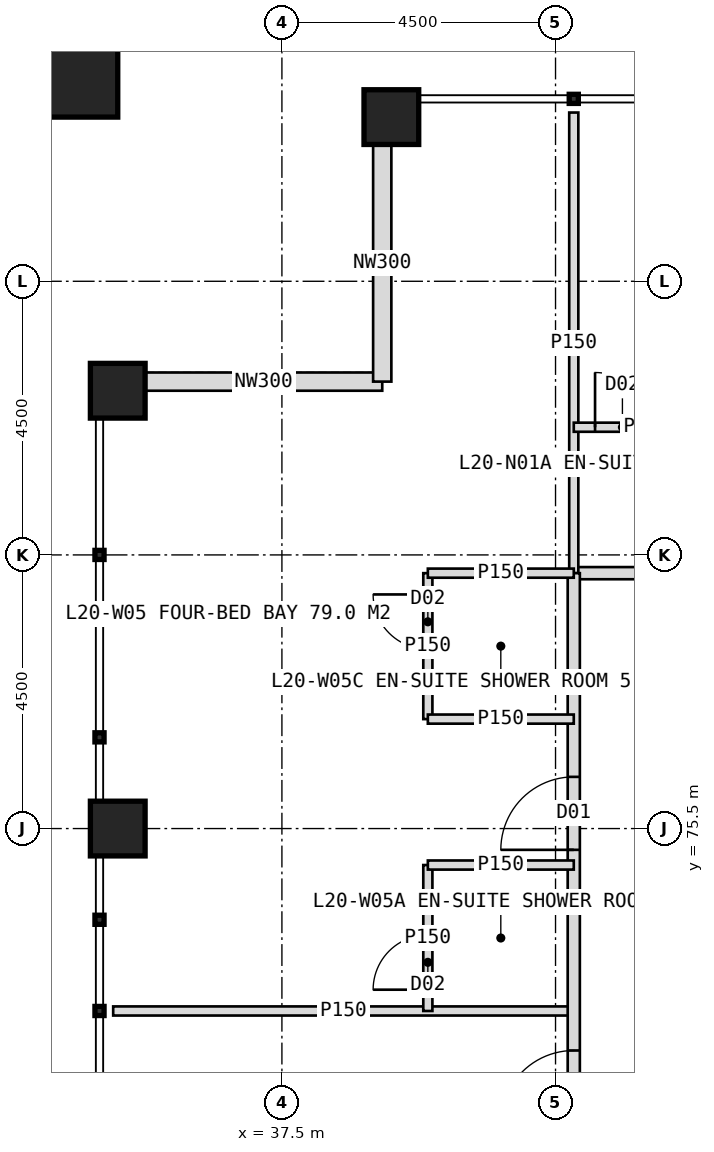
"""IFC4 building model, lengths in metres.
Left out: names, types, materials, properties, quantities, classifications, styles, units other than length and angle.
Written with IfcOpenShell. Run it as: python <this file> out.ifc"""

import sys

from ifc_helpers import new_model, si_unit, direction, frame, frame_2d, origin, origin_2d, place, context, subcontext, project, spatial, rectangle, hollow_rectangle, extrude, element, fill, save


model = new_model("IFC4")
c1 = context("Model", 3, precision=1e-05, world=origin(), true_north=direction((0.0, 1.0)))
c2 = subcontext(c1, "Body", "Model", "MODEL_VIEW")
j1 = project(units=[si_unit("LENGTHUNIT", "METRE"), si_unit("PLANEANGLEUNIT", "RADIAN")], contexts=[c1])
p1 = place(None, origin())
s1 = spatial("IfcSite", under=j1, at=p1, CompositionType="ELEMENT")
p2 = place(p1, origin())
s2 = spatial("IfcBuilding", under=s1, at=p2, CompositionType="ELEMENT")
p3 = place(p2, frame((0.0, 0.0, 87.0)))
s3 = spatial("IfcBuildingStorey", under=s2, at=p3, CompositionType="ELEMENT", Elevation=87.0)
for number, where, z_axis, x_axis in (
    (1, (39.3, 87.2, 0.0), (0.0, 0.0, 1.0), (1.0, 0.0, 0.0)),
    (2, (34.8, 75.5, 0.0), (0.0, 0.0, 1.0), (1.0, 0.0, 0.0)),
    (3, (34.8, 82.7, 0.0), (0.0, 0.0, 1.0), (1.0, 0.0, 0.0)),
):
    element("IfcColumn", number, at=place(p3, frame(where, z_axis=z_axis, x_axis=x_axis)), inside=s3, PredefinedType="COLUMN", context=c2, shape_type="SweptSolid", body=[
        extrude(hollow_rectangle(XDim=0.9, YDim=0.9, WallThickness=0.08, at=origin_2d()), origin(), (0.0, 0.0, 1.0), 4.0),
    ])
p4 = place(p3, frame((33.9, 88.1, 0.0), z_axis=(0.0, 0.0, 1.0), x_axis=(1.0, 0.0, 0.0)))
e4 = element("IfcColumn", 4, at=p4, inside=s3, PredefinedType="COLUMN", context=c2, shape_type="SweptSolid", body=[
    extrude(hollow_rectangle(XDim=1.8, YDim=1.8, WallThickness=0.1, at=origin_2d()), origin(), (0.0, 0.0, 1.0), 4.0),
])
for number, where, z_axis, x_axis in (
    (5, (35.25, 82.85, 0.0), (0.0, 0.0, 1.0), (1.0, 0.0, 0.0)),
    (6, (39.15, 82.85, 0.0), (0.0, 0.0, 1.0), (0.0, 1.0, 0.0)),
):
    element("IfcWall", number, at=place(p3, frame(where, z_axis=z_axis, x_axis=x_axis)), inside=s3, PredefinedType="ELEMENTEDWALL", context=c2, shape_type="SweptSolid", body=[
        extrude(rectangle(XDim=3.9, YDim=0.3, at=frame_2d((1.95, 0.0))), origin(), (0.0, 0.0, 1.0), 2.95),
    ])
p5 = place(p3, frame((42.3, 79.7, 0.0), z_axis=(0.0, 0.0, 1.0), x_axis=(1.0, 0.0, 0.0)))
e7 = element("IfcWall", 7, at=p5, inside=s3, PredefinedType="PARTITIONING", context=c2, shape_type="SweptSolid", body=[
    extrude(rectangle(XDim=35.4, YDim=0.2, at=frame_2d((17.7, 0.0))), origin(), (0.0, 0.0, 1.0), 3.75),
])
p6 = place(p5, frame((2.65, 0.0, 0.0)))
e8 = element("IfcOpeningElement", 8, at=p6, cuts=e7, PredefinedType="OPENING", context=c2, shape_type="SweptSolid", body=[
    extrude(rectangle(XDim=1.2, YDim=2.2, at=frame_2d((0.6, 1.1))), frame((0.0, 0.11, 0.0), z_axis=(0.0, -1.0, 0.0), x_axis=(1.0, 0.0, 0.0)), (0.0, 0.0, 1.0), 0.22),
])
p7 = place(p5, frame((11.2, 0.0, 0.0)))
e9 = element("IfcOpeningElement", 9, at=p7, cuts=e7, PredefinedType="OPENING", context=c2, shape_type="SweptSolid", body=[
    extrude(rectangle(XDim=1.0, YDim=2.1, at=frame_2d((0.5, 1.05))), frame((0.0, 0.11, 0.0), z_axis=(0.0, -1.0, 0.0), x_axis=(1.0, 0.0, 0.0)), (0.0, 0.0, 1.0), 0.22),
])
p8 = place(p5, frame((17.2, 0.0, 0.0)))
e10 = element("IfcOpeningElement", 10, at=p8, cuts=e7, PredefinedType="OPENING", context=c2, shape_type="SweptSolid", body=[
    extrude(rectangle(XDim=1.0, YDim=2.1, at=frame_2d((0.5, 1.05))), frame((0.0, 0.11, 0.0), z_axis=(0.0, -1.0, 0.0), x_axis=(1.0, 0.0, 0.0)), (0.0, 0.0, 1.0), 0.22),
])
p9 = place(p5, frame((23.35, 0.0, 0.0)))
e11 = element("IfcOpeningElement", 11, at=p9, cuts=e7, PredefinedType="OPENING", context=c2, shape_type="SweptSolid", body=[
    extrude(rectangle(XDim=1.2, YDim=2.2, at=frame_2d((0.6, 1.1))), frame((0.0, 0.11, 0.0), z_axis=(0.0, -1.0, 0.0), x_axis=(1.0, 0.0, 0.0)), (0.0, 0.0, 1.0), 0.22),
])
p10 = place(p5, frame((29.35, 0.0, 0.0)))
e12 = element("IfcOpeningElement", 12, at=p10, cuts=e7, PredefinedType="OPENING", context=c2, shape_type="SweptSolid", body=[
    extrude(rectangle(XDim=1.2, YDim=2.2, at=frame_2d((0.6, 1.1))), frame((0.0, 0.11, 0.0), z_axis=(0.0, -1.0, 0.0), x_axis=(1.0, 0.0, 0.0)), (0.0, 0.0, 1.0), 0.22),
])
p11 = place(p3, frame((42.3, 79.7, 0.0), z_axis=(0.0, 0.0, 1.0), x_axis=(0.0, 1.0, 0.0)))
e13 = element("IfcWall", 13, at=p11, inside=s3, PredefinedType="PARTITIONING", context=c2, shape_type="SweptSolid", body=[
    extrude(rectangle(XDim=7.575, YDim=0.15, at=frame_2d((3.788, 0.0))), origin(), (0.0, 0.0, 1.0), 3.75),
])
p12 = place(p3, frame((42.3, 82.1, 0.0), z_axis=(0.0, 0.0, 1.0), x_axis=(1.0, 0.0, 0.0)))
e14 = element("IfcWall", 14, at=p12, inside=s3, PredefinedType="PARTITIONING", context=c2, shape_type="SweptSolid", body=[
    extrude(rectangle(XDim=2.4, YDim=0.15, at=frame_2d((1.2, 0.0))), origin(), (0.0, 0.0, 1.0), 3.75),
])
p13 = place(p12, frame((0.35, 0.0, 0.0)))
e15 = element("IfcOpeningElement", 15, at=p13, cuts=e14, PredefinedType="OPENING", context=c2, shape_type="SweptSolid", body=[
    extrude(rectangle(XDim=0.9, YDim=2.1, at=frame_2d((0.45, 1.05))), frame((0.0, 0.085, 0.0), z_axis=(0.0, -1.0, 0.0), x_axis=(1.0, 0.0, 0.0)), (0.0, 0.0, 1.0), 0.17),
])
p14 = place(p3, frame((42.3, 72.5, 0.0), z_axis=(0.0, 0.0, 1.0), x_axis=(-1.0, 0.0, 0.0)))
e16 = element("IfcWall", 16, at=p14, inside=s3, PredefinedType="PARTITIONING", context=c2, shape_type="SweptSolid", body=[
    extrude(rectangle(XDim=7.575, YDim=0.15, at=frame_2d((3.788, 0.0))), origin(), (0.0, 0.0, 1.0), 3.75),
])
p15 = place(p3, frame((42.3, 44.3, 0.0), z_axis=(0.0, 0.0, 1.0), x_axis=(0.0, 1.0, 0.0)))
e17 = element("IfcWall", 17, at=p15, inside=s3, PredefinedType="PARTITIONING", context=c2, shape_type="SweptSolid", body=[
    extrude(rectangle(XDim=35.4, YDim=0.2, at=frame_2d((17.7, 0.0))), origin(), (0.0, 0.0, 1.0), 3.75),
])
p16 = place(p15, frame((2.65, 0.0, 0.0)))
e18 = element("IfcOpeningElement", 18, at=p16, cuts=e17, PredefinedType="OPENING", context=c2, shape_type="SweptSolid", body=[
    extrude(rectangle(XDim=1.2, YDim=2.2, at=frame_2d((0.6, 1.1))), frame((0.0, 0.11, 0.0), z_axis=(0.0, -1.0, 0.0), x_axis=(1.0, 0.0, 0.0)), (0.0, 0.0, 1.0), 0.22),
])
p17 = place(p15, frame((11.35, 0.0, 0.0)))
e19 = element("IfcOpeningElement", 19, at=p17, cuts=e17, PredefinedType="OPENING", context=c2, shape_type="SweptSolid", body=[
    extrude(rectangle(XDim=1.2, YDim=2.2, at=frame_2d((0.6, 1.1))), frame((0.0, 0.11, 0.0), z_axis=(0.0, -1.0, 0.0), x_axis=(1.0, 0.0, 0.0)), (0.0, 0.0, 1.0), 0.22),
])
p18 = place(p15, frame((20.35, 0.0, 0.0)))
e20 = element("IfcOpeningElement", 20, at=p18, cuts=e17, PredefinedType="OPENING", context=c2, shape_type="SweptSolid", body=[
    extrude(rectangle(XDim=1.2, YDim=2.2, at=frame_2d((0.6, 1.1))), frame((0.0, 0.11, 0.0), z_axis=(0.0, -1.0, 0.0), x_axis=(1.0, 0.0, 0.0)), (0.0, 0.0, 1.0), 0.22),
])
p19 = place(p15, frame((26.35, 0.0, 0.0)))
e21 = element("IfcOpeningElement", 21, at=p19, cuts=e17, PredefinedType="OPENING", context=c2, shape_type="SweptSolid", body=[
    extrude(rectangle(XDim=1.2, YDim=2.2, at=frame_2d((0.6, 1.1))), frame((0.0, 0.11, 0.0), z_axis=(0.0, -1.0, 0.0), x_axis=(1.0, 0.0, 0.0)), (0.0, 0.0, 1.0), 0.22),
])
p20 = place(p15, frame((30.85, 0.0, 0.0)))
e22 = element("IfcOpeningElement", 22, at=p20, cuts=e17, PredefinedType="OPENING", context=c2, shape_type="SweptSolid", body=[
    extrude(rectangle(XDim=1.2, YDim=2.2, at=frame_2d((0.6, 1.1))), frame((0.0, 0.11, 0.0), z_axis=(0.0, -1.0, 0.0), x_axis=(1.0, 0.0, 0.0)), (0.0, 0.0, 1.0), 0.22),
])
p21 = place(p3, frame((39.9, 72.5, 0.0), z_axis=(0.0, 0.0, 1.0), x_axis=(0.0, 1.0, 0.0)))
e23 = element("IfcWall", 23, at=p21, inside=s3, PredefinedType="PARTITIONING", context=c2, shape_type="SweptSolid", body=[
    extrude(rectangle(XDim=2.4, YDim=0.15, at=frame_2d((1.2, 0.0))), origin(), (0.0, 0.0, 1.0), 3.75),
])
p22 = place(p21, frame((0.35, 0.0, 0.0)))
e24 = element("IfcOpeningElement", 24, at=p22, cuts=e23, PredefinedType="OPENING", context=c2, shape_type="SweptSolid", body=[
    extrude(rectangle(XDim=0.9, YDim=2.1, at=frame_2d((0.45, 1.05))), frame((0.0, 0.085, 0.0), z_axis=(0.0, -1.0, 0.0), x_axis=(1.0, 0.0, 0.0)), (0.0, 0.0, 1.0), 0.17),
])
p23 = place(p3, frame((42.3, 74.9, 0.0), z_axis=(0.0, 0.0, 1.0), x_axis=(-1.0, 0.0, 0.0)))
e25 = element("IfcWall", 25, at=p23, inside=s3, PredefinedType="PARTITIONING", context=c2, shape_type="SweptSolid", body=[
    extrude(rectangle(XDim=2.4, YDim=0.15, at=frame_2d((1.2, 0.0))), origin(), (0.0, 0.0, 1.0), 3.75),
])
p24 = place(p3, frame((39.9, 77.3, 0.0), z_axis=(0.0, 0.0, 1.0), x_axis=(0.0, 1.0, 0.0)))
e26 = element("IfcWall", 26, at=p24, inside=s3, PredefinedType="PARTITIONING", context=c2, shape_type="SweptSolid", body=[
    extrude(rectangle(XDim=2.4, YDim=0.15, at=frame_2d((1.2, 0.0))), origin(), (0.0, 0.0, 1.0), 3.75),
])
p25 = place(p24, frame((1.15, 0.0, 0.0)))
e27 = element("IfcOpeningElement", 27, at=p25, cuts=e26, PredefinedType="OPENING", context=c2, shape_type="SweptSolid", body=[
    extrude(rectangle(XDim=0.9, YDim=2.1, at=frame_2d((0.45, 1.05))), frame((0.0, 0.085, 0.0), z_axis=(0.0, -1.0, 0.0), x_axis=(1.0, 0.0, 0.0)), (0.0, 0.0, 1.0), 0.17),
])
for number, where, z_axis, x_axis in (
    (28, (42.3, 77.3, 0.0), (0.0, 0.0, 1.0), (-1.0, 0.0, 0.0)),
    (29, (42.3, 79.7, 0.0), (0.0, 0.0, 1.0), (-1.0, 0.0, 0.0)),
):
    element("IfcWall", number, at=place(p3, frame(where, z_axis=z_axis, x_axis=x_axis)), inside=s3, PredefinedType="PARTITIONING", context=c2, shape_type="SweptSolid", body=[
        extrude(rectangle(XDim=2.4, YDim=0.15, at=frame_2d((1.2, 0.0))), origin(), (0.0, 0.0, 1.0), 3.75),
    ])
p26 = place(p13, origin())
e30 = element("IfcDoor", 30, at=p26, inside=s3, OperationType="SINGLE_SWING_LEFT", PredefinedType="DOOR", context=c2, shape_type="SweptSolid", body=[
    extrude(rectangle(XDim=0.9, YDim=2.1, at=frame_2d((0.45, 1.05))), frame((0.0, 0.025, 0.0), z_axis=(0.0, -1.0, 0.0), x_axis=(1.0, 0.0, 0.0)), (0.0, 0.0, 1.0), 0.05),
])
fill(e15, e30)
p27 = place(p19, origin())
e31 = element("IfcDoor", 31, at=p27, inside=s3, OperationType="SINGLE_SWING_LEFT", PredefinedType="DOOR", context=c2, shape_type="SweptSolid", body=[
    extrude(rectangle(XDim=1.2, YDim=2.2, at=frame_2d((0.6, 1.1))), frame((0.0, 0.025, 0.0), z_axis=(0.0, -1.0, 0.0), x_axis=(1.0, 0.0, 0.0)), (0.0, 0.0, 1.0), 0.05),
])
fill(e21, e31)
p28 = place(p20, origin())
e32 = element("IfcDoor", 32, at=p28, inside=s3, OperationType="SINGLE_SWING_LEFT", PredefinedType="DOOR", context=c2, shape_type="SweptSolid", body=[
    extrude(rectangle(XDim=1.2, YDim=2.2, at=frame_2d((0.6, 1.1))), frame((0.0, 0.025, 0.0), z_axis=(0.0, -1.0, 0.0), x_axis=(1.0, 0.0, 0.0)), (0.0, 0.0, 1.0), 0.05),
])
fill(e22, e32)
p29 = place(p22, origin())
e33 = element("IfcDoor", 33, at=p29, inside=s3, OperationType="SINGLE_SWING_LEFT", PredefinedType="DOOR", context=c2, shape_type="SweptSolid", body=[
    extrude(rectangle(XDim=0.9, YDim=2.1, at=frame_2d((0.45, 1.05))), frame((0.0, 0.025, 0.0), z_axis=(0.0, -1.0, 0.0), x_axis=(1.0, 0.0, 0.0)), (0.0, 0.0, 1.0), 0.05),
])
fill(e24, e33)
p30 = place(p25, origin())
e34 = element("IfcDoor", 34, at=p30, inside=s3, OperationType="SINGLE_SWING_RIGHT", PredefinedType="DOOR", context=c2, shape_type="SweptSolid", body=[
    extrude(rectangle(XDim=0.9, YDim=2.1, at=frame_2d((0.45, 1.05))), frame((0.0, 0.025, 0.0), z_axis=(0.0, -1.0, 0.0), x_axis=(1.0, 0.0, 0.0)), (0.0, 0.0, 1.0), 0.05),
])
fill(e27, e34)
save(model, sys.argv[1])
